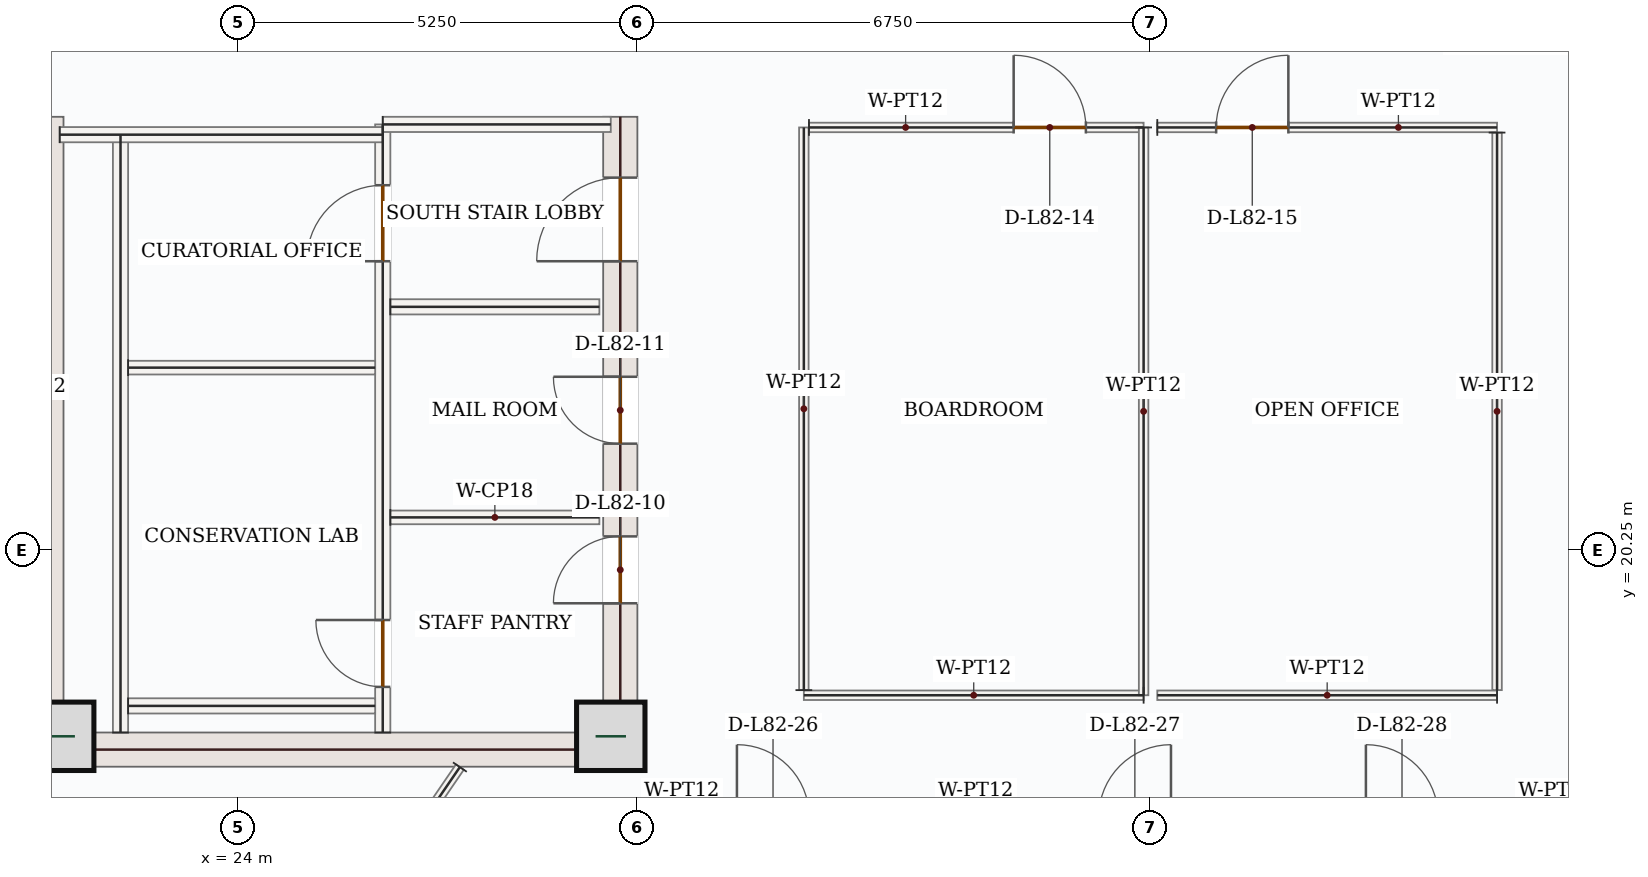
"""IFC4 building model, lengths in metres.
Left out: names, types, materials, properties, quantities, classifications, styles, units other than length and angle.
Written with IfcOpenShell. Run it as: python <this file> out.ifc"""

import sys

from ifc_helpers import new_model, si_unit, direction, frame, frame_2d, origin, origin_2d, place, context, subcontext, project, spatial, rectangle, extrude, source, transform, mapped, element, fill, save


model = new_model("IFC4")
c1 = context("Model", 3, precision=1e-05, world=origin(), true_north=direction((0.0, 1.0)))
c2 = subcontext(c1, "Body", "Model", "MODEL_VIEW")
j1 = project(units=[si_unit("LENGTHUNIT", "METRE"), si_unit("PLANEANGLEUNIT", "RADIAN")], contexts=[c1])
p1 = place(None, origin())
s1 = spatial("IfcSite", under=j1, at=p1, CompositionType="ELEMENT")
p2 = place(p1, origin())
s2 = spatial("IfcBuilding", under=s1, at=p2, CompositionType="ELEMENT")
p3 = place(p2, frame((0.0, 0.0, 338.55)))
s3 = spatial("IfcBuildingStorey", under=s2, at=p3, CompositionType="ELEMENT", Elevation=338.55)
m1 = source(origin(), c2, "Body", "SweptSolid", [
    extrude(rectangle(XDim=8.55, YDim=0.45, at=frame_2d((4.275, 0.0))), origin(), (0.0, 0.0, 1.0), 3.5),
])
p4 = place(p3, frame((21.475, 17.4, 0.0), z_axis=(0.0, 0.0, 1.0), x_axis=(0.0, 1.0, 0.0)))
e1 = element("IfcWall", 1, at=p4, inside=s3, PredefinedType="SHEAR", context=c2, shape_type="MappedRepresentation", body=[
    mapped(m1, transform((0.0, 0.0, 0.0), x_axis=(1.0, 0.0, 0.0), y_axis=(0.0, 1.0, 0.0), z_axis=(0.0, 0.0, 1.0), scale=1.0)),
])
p5 = place(p3, frame((29.025, 17.4, 0.0), z_axis=(0.0, 0.0, 1.0), x_axis=(0.0, 1.0, 0.0)))
e2 = element("IfcWall", 2, at=p5, inside=s3, PredefinedType="SHEAR", context=c2, shape_type="SweptSolid", body=[
    extrude(rectangle(XDim=8.55, YDim=0.45, at=frame_2d((4.275, 0.0))), origin(), (0.0, 0.0, 1.0), 3.5),
])
p6 = place(p5, frame((6.65, 0.0, 0.0)))
e3 = element("IfcOpeningElement", 3, at=p6, cuts=e2, PredefinedType="OPENING", context=c2, shape_type="SweptSolid", body=[
    extrude(rectangle(XDim=1.1, YDim=2.2, at=frame_2d((0.55, 1.1))), frame((0.0, 0.235, 0.0), z_axis=(0.0, -1.0, 0.0), x_axis=(1.0, 0.0, 0.0)), (0.0, 0.0, 1.0), 0.47),
])
p7 = place(p5, frame((2.15, 0.0, 0.0)))
e4 = element("IfcOpeningElement", 4, at=p7, cuts=e2, PredefinedType="OPENING", context=c2, shape_type="SweptSolid", body=[
    extrude(rectangle(XDim=0.88, YDim=2.1, at=frame_2d((0.44, 1.05))), frame((0.0, 0.235, 0.0), z_axis=(0.0, -1.0, 0.0), x_axis=(1.0, 0.0, 0.0)), (0.0, 0.0, 1.0), 0.47),
])
p8 = place(p5, frame((4.25, 0.0, 0.0)))
e5 = element("IfcOpeningElement", 5, at=p8, cuts=e2, PredefinedType="OPENING", context=c2, shape_type="SweptSolid", body=[
    extrude(rectangle(XDim=0.88, YDim=2.1, at=frame_2d((0.44, 1.05))), frame((0.0, 0.235, 0.0), z_axis=(0.0, -1.0, 0.0), x_axis=(1.0, 0.0, 0.0)), (0.0, 0.0, 1.0), 0.47),
])
m2 = source(origin(), c2, "Body", "SweptSolid", [
    extrude(rectangle(XDim=7.1, YDim=0.45, at=frame_2d((3.55, 0.0))), origin(), (0.0, 0.0, 1.0), 3.5),
])
p9 = place(p3, frame((21.7, 17.625, 0.0), z_axis=(0.0, 0.0, 1.0), x_axis=(1.0, 0.0, 0.0)))
e6 = element("IfcWall", 6, at=p9, inside=s3, PredefinedType="SHEAR", context=c2, shape_type="MappedRepresentation", body=[
    mapped(m2, transform((0.0, 0.0, 0.0), x_axis=(1.0, 0.0, 0.0), y_axis=(0.0, 1.0, 0.0), z_axis=(0.0, 0.0, 1.0), scale=1.0)),
])
m3 = source(origin(), c2, "Body", "SweptSolid", [
    extrude(rectangle(XDim=0.9, YDim=0.9, at=origin_2d()), origin(), (0.0, 0.0, 1.0), 3.75),
])
for number, where, z_axis, x_axis in (
    (7, (21.65, 17.8, 0.0), (0.0, 0.0, 1.0), (1.0, 0.0, 0.0)),
    (8, (28.9, 17.8, 0.0), (0.0, 0.0, 1.0), (1.0, 0.0, 0.0)),
):
    element("IfcColumn", number, at=place(p3, frame(where, z_axis=z_axis, x_axis=x_axis)), inside=s3, PredefinedType="COLUMN", context=c2, shape_type="MappedRepresentation", body=[
        mapped(m3, transform((0.0, 0.0, 0.0), x_axis=(1.0, 0.0, 0.0), y_axis=(0.0, 1.0, 0.0), z_axis=(0.0, 0.0, 1.0), scale=1.0)),
    ])
m4 = source(origin(), c2, "Body", "SweptSolid", [
    extrude(rectangle(XDim=7.87, YDim=0.2, at=frame_2d((3.935, 0.0))), origin(), (0.0, 0.0, 1.0), 3.5),
])
p10 = place(p3, frame((22.45, 17.85, 0.0), z_axis=(0.0, 0.0, 1.0), x_axis=(0.0, 1.0, 0.0)))
e9 = element("IfcWall", 9, at=p10, inside=s3, PredefinedType="SOLIDWALL", context=c2, shape_type="MappedRepresentation", body=[
    mapped(m4, transform((0.0, 0.0, 0.0), x_axis=(1.0, 0.0, 0.0), y_axis=(0.0, 1.0, 0.0), z_axis=(0.0, 0.0, 1.0), scale=1.0)),
])
p11 = place(p3, frame((25.9, 17.85, 0.0), z_axis=(0.0, 0.0, 1.0), x_axis=(0.0, 1.0, 0.0)))
e10 = element("IfcWall", 10, at=p11, inside=s3, PredefinedType="SOLIDWALL", context=c2, shape_type="SweptSolid", body=[
    extrude(rectangle(XDim=8.0, YDim=0.2, at=frame_2d((4.0, 0.0))), origin(), (0.0, 0.0, 1.0), 3.5),
])
p12 = place(p11, frame((6.2, 0.0, 0.0)))
e11 = element("IfcOpeningElement", 11, at=p12, cuts=e10, PredefinedType="OPENING", context=c2, shape_type="SweptSolid", body=[
    extrude(rectangle(XDim=1.0, YDim=2.15, at=frame_2d((0.5, 1.075))), frame((0.0, 0.11, 0.0), z_axis=(0.0, -1.0, 0.0), x_axis=(1.0, 0.0, 0.0)), (0.0, 0.0, 1.0), 0.22),
])
p13 = place(p11, frame((0.6, 0.0, 0.0)))
e12 = element("IfcOpeningElement", 12, at=p13, cuts=e10, PredefinedType="OPENING", context=c2, shape_type="SweptSolid", body=[
    extrude(rectangle(XDim=0.88, YDim=2.1, at=frame_2d((0.44, 1.05))), frame((0.0, 0.11, 0.0), z_axis=(0.0, -1.0, 0.0), x_axis=(1.0, 0.0, 0.0)), (0.0, 0.0, 1.0), 0.22),
])
m5 = source(origin(), c2, "Body", "SweptSolid", [
    extrude(rectangle(XDim=4.25, YDim=0.2, at=frame_2d((2.125, 0.0))), origin(), (0.0, 0.0, 1.0), 3.5),
])
p14 = place(p3, frame((21.65, 25.715, 0.0), z_axis=(0.0, 0.0, 1.0), x_axis=(1.0, 0.0, 0.0)))
e13 = element("IfcWall", 13, at=p14, inside=s3, PredefinedType="SOLIDWALL", context=c2, shape_type="MappedRepresentation", body=[
    mapped(m5, transform((0.0, 0.0, 0.0), x_axis=(1.0, 0.0, 0.0), y_axis=(0.0, 1.0, 0.0), z_axis=(0.0, 0.0, 1.0), scale=1.0)),
])
m6 = source(origin(), c2, "Body", "SweptSolid", [
    extrude(rectangle(XDim=3.0, YDim=0.2, at=frame_2d((1.5, 0.0))), origin(), (0.0, 0.0, 1.0), 3.5),
])
p15 = place(p3, frame((25.9, 25.85, 0.0), z_axis=(0.0, 0.0, 1.0), x_axis=(1.0, 0.0, 0.0)))
e14 = element("IfcWall", 14, at=p15, inside=s3, PredefinedType="SOLIDWALL", context=c2, shape_type="MappedRepresentation", body=[
    mapped(m6, transform((0.0, 0.0, 0.0), x_axis=(1.0, 0.0, 0.0), y_axis=(0.0, 1.0, 0.0), z_axis=(0.0, 0.0, 1.0), scale=1.0)),
])
m7 = source(origin(), c2, "Body", "SweptSolid", [
    extrude(rectangle(XDim=3.25, YDim=0.2, at=frame_2d((1.625, 0.0))), origin(), (0.0, 0.0, 1.0), 3.5),
])
p16 = place(p3, frame((22.55, 18.2, 0.0), z_axis=(0.0, 0.0, 1.0), x_axis=(1.0, 0.0, 0.0)))
e15 = element("IfcWall", 15, at=p16, inside=s3, PredefinedType="SOLIDWALL", context=c2, shape_type="MappedRepresentation", body=[
    mapped(m7, transform((0.0, 0.0, 0.0), x_axis=(1.0, 0.0, 0.0), y_axis=(0.0, 1.0, 0.0), z_axis=(0.0, 0.0, 1.0), scale=1.0)),
])
m8 = source(origin(), c2, "Body", "SweptSolid", [
    extrude(rectangle(XDim=3.25, YDim=0.18, at=frame_2d((1.625, 0.0))), origin(), (0.0, 0.0, 1.0), 3.5),
])
p17 = place(p3, frame((22.55, 22.65, 0.0), z_axis=(0.0, 0.0, 1.0), x_axis=(1.0, 0.0, 0.0)))
e16 = element("IfcWall", 16, at=p17, inside=s3, PredefinedType="PARTITIONING", context=c2, shape_type="MappedRepresentation", body=[
    mapped(m8, transform((0.0, 0.0, 0.0), x_axis=(1.0, 0.0, 0.0), y_axis=(0.0, 1.0, 0.0), z_axis=(0.0, 0.0, 1.0), scale=1.0)),
])
m9 = source(origin(), c2, "Body", "SweptSolid", [
    extrude(rectangle(XDim=2.75, YDim=0.2, at=frame_2d((1.375, 0.0))), origin(), (0.0, 0.0, 1.0), 3.5),
])
p18 = place(p3, frame((26.0, 23.45, 0.0), z_axis=(0.0, 0.0, 1.0), x_axis=(1.0, 0.0, 0.0)))
e17 = element("IfcWall", 17, at=p18, inside=s3, PredefinedType="SOLIDWALL", context=c2, shape_type="MappedRepresentation", body=[
    mapped(m9, transform((0.0, 0.0, 0.0), x_axis=(1.0, 0.0, 0.0), y_axis=(0.0, 1.0, 0.0), z_axis=(0.0, 0.0, 1.0), scale=1.0)),
])
m10 = source(origin(), c2, "Body", "SweptSolid", [
    extrude(rectangle(XDim=2.75, YDim=0.18, at=frame_2d((1.375, 0.0))), origin(), (0.0, 0.0, 1.0), 3.5),
])
p19 = place(p3, frame((26.0, 20.68, 0.0), z_axis=(0.0, 0.0, 1.0), x_axis=(1.0, 0.0, 0.0)))
e18 = element("IfcWall", 18, at=p19, inside=s3, PredefinedType="PARTITIONING", context=c2, shape_type="MappedRepresentation", body=[
    mapped(m10, transform((0.0, 0.0, 0.0), x_axis=(1.0, 0.0, 0.0), y_axis=(0.0, 1.0, 0.0), z_axis=(0.0, 0.0, 1.0), scale=1.0)),
])
m11 = source(origin(), c2, "Body", "SweptSolid", [
    extrude(rectangle(XDim=2.511, YDim=0.125, at=frame_2d((1.255, 0.0))), origin(), (0.0, 0.0, 1.0), 3.5),
])
p20 = place(p3, frame((26.915, 17.395, 0.0), z_axis=(0.0, 0.0, 1.0), x_axis=(-0.564980194272, -0.825104466162, 0.0)))
e19 = element("IfcWall", 19, at=p20, inside=s3, PredefinedType="PARTITIONING", context=c2, shape_type="MappedRepresentation", body=[
    mapped(m11, transform((0.0, 0.0, 0.0), x_axis=(1.0, 0.0, 0.0), y_axis=(0.0, 1.0, 0.0), z_axis=(0.0, 0.0, 1.0), scale=1.0)),
])
m12 = source(origin(), c2, "Body", "SweptSolid", [
    extrude(rectangle(XDim=4.47, YDim=0.125, at=frame_2d((2.235, 0.0))), origin(), (0.0, 0.0, 1.0), 3.5),
])
p21 = place(p3, frame((35.91, 18.34, 0.0), z_axis=(0.0, 0.0, 1.0), x_axis=(-1.0, 0.0, 0.0)))
e20 = element("IfcWall", 20, at=p21, inside=s3, PredefinedType="PARTITIONING", context=c2, shape_type="MappedRepresentation", body=[
    mapped(m12, transform((0.0, 0.0, 0.0), x_axis=(1.0, 0.0, 0.0), y_axis=(0.0, 1.0, 0.0), z_axis=(0.0, 0.0, 1.0), scale=1.0)),
])
m13 = source(origin(), c2, "Body", "SweptSolid", [
    extrude(rectangle(XDim=7.403, YDim=0.125, at=frame_2d((3.701, 0.0))), origin(), (0.0, 0.0, 1.0), 3.5),
])
p22 = place(p3, frame((31.44, 18.407, 0.0), z_axis=(0.0, 0.0, 1.0), x_axis=(0.0, 1.0, 0.0)))
e21 = element("IfcWall", 21, at=p22, inside=s3, PredefinedType="PARTITIONING", context=c2, shape_type="MappedRepresentation", body=[
    mapped(m13, transform((0.0, 0.0, 0.0), x_axis=(1.0, 0.0, 0.0), y_axis=(0.0, 1.0, 0.0), z_axis=(0.0, 0.0, 1.0), scale=1.0)),
])
p23 = place(p3, frame((31.508, 25.81, 0.0), z_axis=(0.0, 0.0, 1.0), x_axis=(1.0, 0.0, 0.0)))
e22 = element("IfcWall", 22, at=p23, inside=s3, PredefinedType="PARTITIONING", context=c2, shape_type="SweptSolid", body=[
    extrude(rectangle(XDim=4.402, YDim=0.125, at=frame_2d((2.201, 0.0))), origin(), (0.0, 0.0, 1.0), 3.5),
])
p24 = place(p23, frame((2.693, 0.0, 0.0)))
e23 = element("IfcOpeningElement", 23, at=p24, cuts=e22, PredefinedType="OPENING", context=c2, shape_type="SweptSolid", body=[
    extrude(rectangle(XDim=0.95, YDim=2.15, at=frame_2d((0.475, 1.075))), frame((0.0, 0.073, 0.0), z_axis=(0.0, -1.0, 0.0), x_axis=(1.0, 0.0, 0.0)), (0.0, 0.0, 1.0), 0.145),
])
m14 = source(origin(), c2, "Body", "SweptSolid", [
    extrude(rectangle(XDim=7.47, YDim=0.125, at=frame_2d((3.735, 0.0))), origin(), (0.0, 0.0, 1.0), 3.5),
])
p25 = place(p3, frame((35.91, 25.81, 0.0), z_axis=(0.0, 0.0, 1.0), x_axis=(0.0, -1.0, 0.0)))
e24 = element("IfcWall", 24, at=p25, inside=s3, PredefinedType="PARTITIONING", context=c2, shape_type="MappedRepresentation", body=[
    mapped(m14, transform((0.0, 0.0, 0.0), x_axis=(1.0, 0.0, 0.0), y_axis=(0.0, 1.0, 0.0), z_axis=(0.0, 0.0, 1.0), scale=1.0)),
])
p26 = place(p3, frame((40.56, 18.34, 0.0), z_axis=(0.0, 0.0, 1.0), x_axis=(-1.0, 0.0, 0.0)))
e25 = element("IfcWall", 25, at=p26, inside=s3, PredefinedType="PARTITIONING", context=c2, shape_type="MappedRepresentation", body=[
    mapped(m12, transform((0.0, 0.0, 0.0), x_axis=(1.0, 0.0, 0.0), y_axis=(0.0, 1.0, 0.0), z_axis=(0.0, 0.0, 1.0), scale=1.0)),
])
p27 = place(p3, frame((36.09, 25.81, 0.0), z_axis=(0.0, 0.0, 1.0), x_axis=(1.0, 0.0, 0.0)))
e26 = element("IfcWall", 26, at=p27, inside=s3, PredefinedType="PARTITIONING", context=c2, shape_type="SweptSolid", body=[
    extrude(rectangle(XDim=4.47, YDim=0.125, at=frame_2d((2.235, 0.0))), origin(), (0.0, 0.0, 1.0), 3.5),
])
p28 = place(p27, frame((0.774, 0.0, 0.0)))
e27 = element("IfcOpeningElement", 27, at=p28, cuts=e26, PredefinedType="OPENING", context=c2, shape_type="SweptSolid", body=[
    extrude(rectangle(XDim=0.95, YDim=2.15, at=frame_2d((0.475, 1.075))), frame((0.0, 0.073, 0.0), z_axis=(0.0, -1.0, 0.0), x_axis=(1.0, 0.0, 0.0)), (0.0, 0.0, 1.0), 0.145),
])
m15 = source(origin(), c2, "Body", "SweptSolid", [
    extrude(rectangle(XDim=7.335, YDim=0.125, at=frame_2d((3.667, 0.0))), origin(), (0.0, 0.0, 1.0), 3.5),
])
p29 = place(p3, frame((40.56, 25.742, 0.0), z_axis=(0.0, 0.0, 1.0), x_axis=(0.0, -1.0, 0.0)))
e28 = element("IfcWall", 28, at=p29, inside=s3, PredefinedType="PARTITIONING", context=c2, shape_type="MappedRepresentation", body=[
    mapped(m15, transform((0.0, 0.0, 0.0), x_axis=(1.0, 0.0, 0.0), y_axis=(0.0, 1.0, 0.0), z_axis=(0.0, 0.0, 1.0), scale=1.0)),
])
m16 = source(origin(), c2, "Body", "SweptSolid", [
    extrude(rectangle(XDim=1.0, YDim=2.15, at=frame_2d((0.5, 1.075))), frame((0.0, 0.025, 0.0), z_axis=(0.0, -1.0, 0.0), x_axis=(1.0, 0.0, 0.0)), (0.0, 0.0, 1.0), 0.05),
])
p30 = place(p12, origin())
e29 = element("IfcDoor", 29, at=p30, inside=s3, OperationType="SINGLE_SWING_LEFT", PredefinedType="DOOR", context=c2, shape_type="MappedRepresentation", body=[
    mapped(m16, transform((0.0, 0.0, 0.0), x_axis=(1.0, 0.0, 0.0), y_axis=(0.0, 1.0, 0.0), z_axis=(0.0, 0.0, 1.0), scale=1.0)),
])
fill(e11, e29)
m17 = source(origin(), c2, "Body", "SweptSolid", [
    extrude(rectangle(XDim=0.88, YDim=2.1, at=frame_2d((0.44, 1.05))), frame((0.0, 0.025, 0.0), z_axis=(0.0, -1.0, 0.0), x_axis=(1.0, 0.0, 0.0)), (0.0, 0.0, 1.0), 0.05),
])
p31 = place(p13, origin())
e30 = element("IfcDoor", 30, at=p31, inside=s3, OperationType="SINGLE_SWING_RIGHT", PredefinedType="DOOR", context=c2, shape_type="MappedRepresentation", body=[
    mapped(m17, transform((0.0, 0.0, 0.0), x_axis=(1.0, 0.0, 0.0), y_axis=(0.0, 1.0, 0.0), z_axis=(0.0, 0.0, 1.0), scale=1.0)),
])
fill(e12, e30)
m18 = source(origin(), c2, "Body", "SweptSolid", [
    extrude(rectangle(XDim=1.1, YDim=2.2, at=frame_2d((0.55, 1.1))), frame((0.0, 0.025, 0.0), z_axis=(0.0, -1.0, 0.0), x_axis=(1.0, 0.0, 0.0)), (0.0, 0.0, 1.0), 0.05),
])
p32 = place(p6, origin())
e31 = element("IfcDoor", 31, at=p32, inside=s3, OperationType="SINGLE_SWING_LEFT", PredefinedType="DOOR", context=c2, shape_type="MappedRepresentation", body=[
    mapped(m18, transform((0.0, 0.0, 0.0), x_axis=(1.0, 0.0, 0.0), y_axis=(0.0, 1.0, 0.0), z_axis=(0.0, 0.0, 1.0), scale=1.0)),
])
fill(e3, e31)
p33 = place(p7, origin())
e32 = element("IfcDoor", 32, at=p33, inside=s3, OperationType="SINGLE_SWING_LEFT", PredefinedType="DOOR", context=c2, shape_type="MappedRepresentation", body=[
    mapped(m17, transform((0.0, 0.0, 0.0), x_axis=(1.0, 0.0, 0.0), y_axis=(0.0, 1.0, 0.0), z_axis=(0.0, 0.0, 1.0), scale=1.0)),
])
fill(e4, e32)
p34 = place(p8, origin())
e33 = element("IfcDoor", 33, at=p34, inside=s3, OperationType="SINGLE_SWING_RIGHT", PredefinedType="DOOR", context=c2, shape_type="MappedRepresentation", body=[
    mapped(m17, transform((0.0, 0.0, 0.0), x_axis=(1.0, 0.0, 0.0), y_axis=(0.0, 1.0, 0.0), z_axis=(0.0, 0.0, 1.0), scale=1.0)),
])
fill(e5, e33)
m19 = source(origin(), c2, "Body", "SweptSolid", [
    extrude(rectangle(XDim=0.95, YDim=2.15, at=frame_2d((0.475, 1.075))), frame((0.0, 0.025, 0.0), z_axis=(0.0, -1.0, 0.0), x_axis=(1.0, 0.0, 0.0)), (0.0, 0.0, 1.0), 0.05),
])
p35 = place(p24, origin())
e34 = element("IfcDoor", 34, at=p35, inside=s3, OperationType="SINGLE_SWING_LEFT", PredefinedType="DOOR", context=c2, shape_type="MappedRepresentation", body=[
    mapped(m19, transform((0.0, 0.0, 0.0), x_axis=(1.0, 0.0, 0.0), y_axis=(0.0, 1.0, 0.0), z_axis=(0.0, 0.0, 1.0), scale=1.0)),
])
fill(e23, e34)
p36 = place(p28, origin())
e35 = element("IfcDoor", 35, at=p36, inside=s3, OperationType="SINGLE_SWING_RIGHT", PredefinedType="DOOR", context=c2, shape_type="MappedRepresentation", body=[
    mapped(m19, transform((0.0, 0.0, 0.0), x_axis=(1.0, 0.0, 0.0), y_axis=(0.0, 1.0, 0.0), z_axis=(0.0, 0.0, 1.0), scale=1.0)),
])
fill(e27, e35)
save(model, sys.argv[1])
